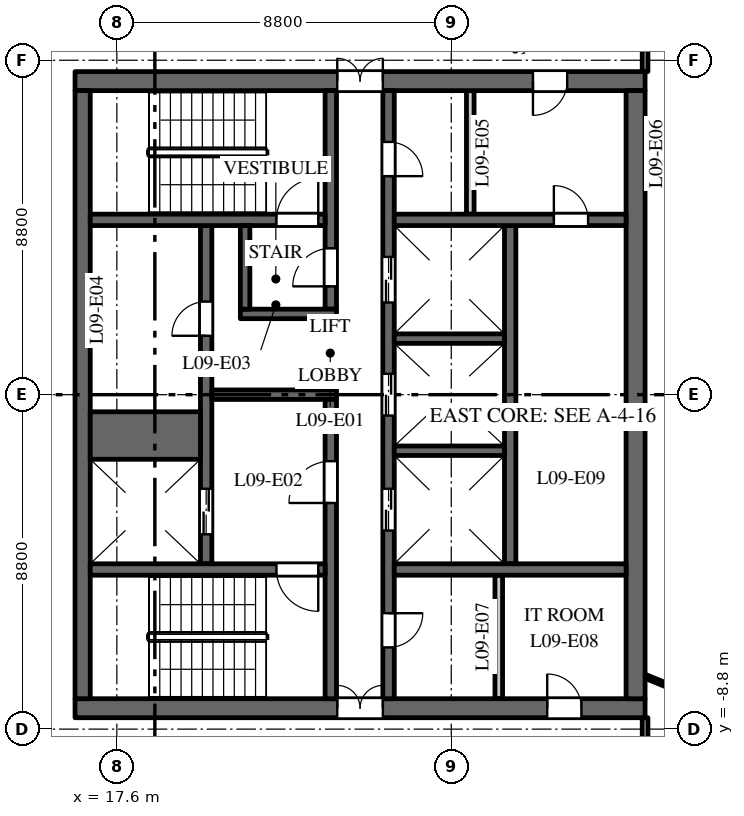
"""IFC4 building model, lengths in metres.
Left out: names, types, materials, properties, quantities, classifications, styles, units other than length and angle.
Written with IfcOpenShell. Run it as: python <this file> out.ifc"""

import sys

from ifc_helpers import new_model, si_unit, direction, frame, frame_2d, origin, place, context, subcontext, project, spatial, rectangle, extrude, element, fill, save


model = new_model("IFC4")
c1 = context("Model", 3, precision=1e-05, world=origin(), true_north=direction((0.0, 1.0)))
c2 = subcontext(c1, "Body", "Model", "MODEL_VIEW")
j1 = project(units=[si_unit("LENGTHUNIT", "METRE"), si_unit("PLANEANGLEUNIT", "RADIAN")], contexts=[c1])
p1 = place(None, origin())
s1 = spatial("IfcSite", under=j1, at=p1, CompositionType="ELEMENT")
p2 = place(p1, origin())
s2 = spatial("IfcBuilding", under=s1, at=p2, CompositionType="ELEMENT")
p3 = place(p2, frame((0.0, 0.0, 46.5)))
s3 = spatial("IfcBuildingStorey", under=s2, at=p3, CompositionType="ELEMENT", Elevation=46.5)
p4 = place(p3, frame((16.5, 8.25, 0.0), z_axis=(0.0, 0.0, 1.0), x_axis=(1.0, 0.0, 0.0)))
e1 = element("IfcWall", 1, at=p4, inside=s3, PredefinedType="SHEAR", context=c2, shape_type="SweptSolid", body=[
    extrude(rectangle(XDim=15.0, YDim=0.5, at=frame_2d((7.5, 0.0))), origin(), (0.0, 0.0, 1.0), 3.7),
])
p5 = place(p4, frame((6.9, 0.0, 0.0)))
e2 = element("IfcOpeningElement", 2, at=p5, cuts=e1, PredefinedType="OPENING", context=c2, shape_type="SweptSolid", body=[
    extrude(rectangle(XDim=1.2, YDim=2.1, at=frame_2d((0.6, 1.05))), frame((0.0, 0.26, 0.0), z_axis=(0.0, -1.0, 0.0), x_axis=(1.0, 0.0, 0.0)), (0.0, 0.0, 1.0), 0.52),
])
p6 = place(p4, frame((12.05, 0.0, 0.0)))
e3 = element("IfcOpeningElement", 3, at=p6, cuts=e1, PredefinedType="OPENING", context=c2, shape_type="SweptSolid", body=[
    extrude(rectangle(XDim=0.9, YDim=2.1, at=frame_2d((0.45, 1.05))), frame((0.0, 0.26, 0.0), z_axis=(0.0, -1.0, 0.0), x_axis=(1.0, 0.0, 0.0)), (0.0, 0.0, 1.0), 0.52),
])
p7 = place(p3, frame((16.5, -8.25, 0.0), z_axis=(0.0, 0.0, 1.0), x_axis=(1.0, 0.0, 0.0)))
e4 = element("IfcWall", 4, at=p7, inside=s3, PredefinedType="SHEAR", context=c2, shape_type="SweptSolid", body=[
    extrude(rectangle(XDim=15.0, YDim=0.5, at=frame_2d((7.5, 0.0))), origin(), (0.0, 0.0, 1.0), 3.7),
])
p8 = place(p7, frame((6.9, 0.0, 0.0)))
e5 = element("IfcOpeningElement", 5, at=p8, cuts=e4, PredefinedType="OPENING", context=c2, shape_type="SweptSolid", body=[
    extrude(rectangle(XDim=1.2, YDim=2.1, at=frame_2d((0.6, 1.05))), frame((0.0, 0.26, 0.0), z_axis=(0.0, -1.0, 0.0), x_axis=(1.0, 0.0, 0.0)), (0.0, 0.0, 1.0), 0.52),
])
p9 = place(p7, frame((12.425, 0.0, 0.0)))
e6 = element("IfcOpeningElement", 6, at=p9, cuts=e4, PredefinedType="OPENING", context=c2, shape_type="SweptSolid", body=[
    extrude(rectangle(XDim=0.9, YDim=2.1, at=frame_2d((0.45, 1.05))), frame((0.0, 0.26, 0.0), z_axis=(0.0, -1.0, 0.0), x_axis=(1.0, 0.0, 0.0)), (0.0, 0.0, 1.0), 0.52),
])
p10 = place(p3, frame((27.95, -4.45, 0.0), z_axis=(0.0, 0.0, 1.0), x_axis=(0.0, 1.0, 0.0)))
e7 = element("IfcWall", 7, at=p10, inside=s3, PredefinedType="SHEAR", context=c2, shape_type="SweptSolid", body=[
    extrude(rectangle(XDim=8.9, YDim=0.3, at=frame_2d((4.45, 0.0))), origin(), (0.0, 0.0, 1.0), 3.7),
])
p11 = place(p3, frame((19.95, -4.45, 0.0), z_axis=(0.0, 0.0, 1.0), x_axis=(0.0, 1.0, 0.0)))
e8 = element("IfcWall", 8, at=p11, inside=s3, PredefinedType="SHEAR", context=c2, shape_type="SweptSolid", body=[
    extrude(rectangle(XDim=8.9, YDim=0.3, at=frame_2d((4.45, 0.0))), origin(), (0.0, 0.0, 1.0), 3.7),
])
p12 = place(p11, frame((0.775, 0.0, 0.0)))
e9 = element("IfcOpeningElement", 9, at=p12, cuts=e8, PredefinedType="OPENING", context=c2, shape_type="SweptSolid", body=[
    extrude(rectangle(XDim=1.2, YDim=2.1, at=frame_2d((0.6, 1.05))), frame((0.0, 0.16, 0.0), z_axis=(0.0, -1.0, 0.0), x_axis=(1.0, 0.0, 0.0)), (0.0, 0.0, 1.0), 0.32),
])
p13 = place(p11, frame((6.0, 0.0, 0.0)))
e10 = element("IfcOpeningElement", 10, at=p13, cuts=e8, PredefinedType="OPENING", context=c2, shape_type="SweptSolid", body=[
    extrude(rectangle(XDim=0.9, YDim=2.1, at=frame_2d((0.45, 1.05))), frame((0.0, 0.16, 0.0), z_axis=(0.0, -1.0, 0.0), x_axis=(1.0, 0.0, 0.0)), (0.0, 0.0, 1.0), 0.32),
])
p14 = place(p3, frame((24.75, -8.0, 0.0), z_axis=(0.0, 0.0, 1.0), x_axis=(0.0, 1.0, 0.0)))
e11 = element("IfcWall", 11, at=p14, inside=s3, PredefinedType="SHEAR", context=c2, shape_type="SweptSolid", body=[
    extrude(rectangle(XDim=16.0, YDim=0.3, at=frame_2d((8.0, 0.0))), origin(), (0.0, 0.0, 1.0), 3.7),
])
p15 = place(p14, frame((4.425, 0.0, 0.0)))
e12 = element("IfcOpeningElement", 12, at=p15, cuts=e11, PredefinedType="OPENING", context=c2, shape_type="SweptSolid", body=[
    extrude(rectangle(XDim=1.1, YDim=2.1, at=frame_2d((0.55, 1.05))), frame((0.0, 0.16, 0.0), z_axis=(0.0, -1.0, 0.0), x_axis=(1.0, 0.0, 0.0)), (0.0, 0.0, 1.0), 0.32),
])
p16 = place(p14, frame((7.45, 0.0, 0.0)))
e13 = element("IfcOpeningElement", 13, at=p16, cuts=e11, PredefinedType="OPENING", context=c2, shape_type="SweptSolid", body=[
    extrude(rectangle(XDim=1.1, YDim=2.1, at=frame_2d((0.55, 1.05))), frame((0.0, 0.16, 0.0), z_axis=(0.0, -1.0, 0.0), x_axis=(1.0, 0.0, 0.0)), (0.0, 0.0, 1.0), 0.32),
])
p17 = place(p14, frame((10.425, 0.0, 0.0)))
e14 = element("IfcOpeningElement", 14, at=p17, cuts=e11, PredefinedType="OPENING", context=c2, shape_type="SweptSolid", body=[
    extrude(rectangle(XDim=1.2, YDim=2.1, at=frame_2d((0.6, 1.05))), frame((0.0, 0.16, 0.0), z_axis=(0.0, -1.0, 0.0), x_axis=(1.0, 0.0, 0.0)), (0.0, 0.0, 1.0), 0.32),
])
p18 = place(p14, frame((13.75, 0.0, 0.0)))
e15 = element("IfcOpeningElement", 15, at=p18, cuts=e11, PredefinedType="OPENING", context=c2, shape_type="SweptSolid", body=[
    extrude(rectangle(XDim=0.9, YDim=2.1, at=frame_2d((0.45, 1.05))), frame((0.0, 0.16, 0.0), z_axis=(0.0, -1.0, 0.0), x_axis=(1.0, 0.0, 0.0)), (0.0, 0.0, 1.0), 0.32),
])
p19 = place(p14, frame((1.35, 0.0, 0.0)))
e16 = element("IfcOpeningElement", 16, at=p19, cuts=e11, PredefinedType="OPENING", context=c2, shape_type="SweptSolid", body=[
    extrude(rectangle(XDim=0.9, YDim=2.1, at=frame_2d((0.45, 1.05))), frame((0.0, 0.16, 0.0), z_axis=(0.0, -1.0, 0.0), x_axis=(1.0, 0.0, 0.0)), (0.0, 0.0, 1.0), 0.32),
])
p20 = place(p3, frame((20.1, 0.0, 0.0), z_axis=(0.0, 0.0, 1.0), x_axis=(1.0, 0.0, 0.0)))
e17 = element("IfcWall", 17, at=p20, inside=s3, PredefinedType="SHEAR", context=c2, shape_type="SweptSolid", body=[
    extrude(rectangle(XDim=3.28, YDim=0.25, at=frame_2d((1.64, 0.0))), origin(), (0.0, 0.0, 1.0), 3.7),
])
p21 = place(p3, frame((16.7, -8.0, 0.0), z_axis=(0.0, 0.0, 1.0), x_axis=(0.0, 1.0, 0.0)))
e18 = element("IfcWall", 18, at=p21, inside=s3, PredefinedType="SHEAR", context=c2, shape_type="SweptSolid", body=[
    extrude(rectangle(XDim=16.0, YDim=0.4, at=frame_2d((8.0, 0.0))), origin(), (0.0, 0.0, 1.0), 3.7),
])
p22 = place(p3, frame((31.25, -8.0, 0.0), z_axis=(0.0, 0.0, 1.0), x_axis=(0.0, 1.0, 0.0)))
e19 = element("IfcWall", 19, at=p22, inside=s3, PredefinedType="SHEAR", context=c2, shape_type="SweptSolid", body=[
    extrude(rectangle(XDim=16.0, YDim=0.5, at=frame_2d((8.0, 0.0))), origin(), (0.0, 0.0, 1.0), 3.7),
])
p23 = place(p3, frame((24.9, 4.6, 0.0), z_axis=(0.0, 0.0, 1.0), x_axis=(1.0, 0.0, 0.0)))
e20 = element("IfcWall", 20, at=p23, inside=s3, PredefinedType="SHEAR", context=c2, shape_type="SweptSolid", body=[
    extrude(rectangle(XDim=6.1, YDim=0.3, at=frame_2d((3.05, 0.0))), origin(), (0.0, 0.0, 1.0), 3.7),
])
p24 = place(p23, frame((4.2, 0.0, 0.0)))
e21 = element("IfcOpeningElement", 21, at=p24, cuts=e20, PredefinedType="OPENING", context=c2, shape_type="SweptSolid", body=[
    extrude(rectangle(XDim=0.9, YDim=2.1, at=frame_2d((0.45, 1.05))), frame((0.0, 0.16, 0.0), z_axis=(0.0, -1.0, 0.0), x_axis=(1.0, 0.0, 0.0)), (0.0, 0.0, 1.0), 0.32),
])
for number, where, z_axis, x_axis in (
    (22, (26.9, 4.75, 0.0), (0.0, 0.0, 1.0), (0.0, 1.0, 0.0)),
    (23, (27.65, -8.0, 0.0), (0.0, 0.0, 1.0), (0.0, 1.0, 0.0)),
):
    element("IfcWall", number, at=place(p3, frame(where, z_axis=z_axis, x_axis=x_axis)), inside=s3, PredefinedType="PARTITIONING", context=c2, shape_type="SweptSolid", body=[
        extrude(rectangle(XDim=3.25, YDim=0.2, at=frame_2d((1.625, 0.0))), origin(), (0.0, 0.0, 1.0), 3.7),
    ])
p25 = place(p3, frame((24.9, -4.6, 0.0), z_axis=(0.0, 0.0, 1.0), x_axis=(1.0, 0.0, 0.0)))
e24 = element("IfcWall", 24, at=p25, inside=s3, PredefinedType="SHEAR", context=c2, shape_type="SweptSolid", body=[
    extrude(rectangle(XDim=6.1, YDim=0.3, at=frame_2d((3.05, 0.0))), origin(), (0.0, 0.0, 1.0), 3.7),
])
p26 = place(p3, frame((16.9, -1.075, 0.0), z_axis=(0.0, 0.0, 1.0), x_axis=(1.0, 0.0, 0.0)))
e25 = element("IfcWall", 25, at=p26, inside=s3, PredefinedType="SHEAR", context=c2, shape_type="SweptSolid", body=[
    extrude(rectangle(XDim=2.9, YDim=1.25, at=frame_2d((1.45, 0.0))), origin(), (0.0, 0.0, 1.0), 3.7),
])
for number, where, z_axis, x_axis in (
    (26, (24.9, -1.475, 0.0), (0.0, 0.0, 1.0), (1.0, 0.0, 0.0)),
    (27, (24.9, 1.475, 0.0), (0.0, 0.0, 1.0), (1.0, 0.0, 0.0)),
):
    element("IfcWall", number, at=place(p3, frame(where, z_axis=z_axis, x_axis=x_axis)), inside=s3, PredefinedType="SHEAR", context=c2, shape_type="SweptSolid", body=[
        extrude(rectangle(XDim=2.9, YDim=0.25, at=frame_2d((1.45, 0.0))), origin(), (0.0, 0.0, 1.0), 3.7),
    ])
p27 = place(p3, frame((23.23, 2.25, 0.0), z_axis=(0.0, 0.0, 1.0), x_axis=(0.0, 1.0, 0.0)))
e28 = element("IfcWall", 28, at=p27, inside=s3, PredefinedType="SHEAR", context=c2, shape_type="SweptSolid", body=[
    extrude(rectangle(XDim=5.75, YDim=0.3, at=frame_2d((2.875, 0.0))), origin(), (0.0, 0.0, 1.0), 3.7),
])
p28 = place(p27, frame((0.6, 0.0, 0.0)))
e29 = element("IfcOpeningElement", 29, at=p28, cuts=e28, PredefinedType="OPENING", context=c2, shape_type="SweptSolid", body=[
    extrude(rectangle(XDim=1.0, YDim=2.1, at=frame_2d((0.5, 1.05))), frame((0.0, 0.16, 0.0), z_axis=(0.0, -1.0, 0.0), x_axis=(1.0, 0.0, 0.0)), (0.0, 0.0, 1.0), 0.32),
])
p29 = place(p3, frame((23.23, -8.0, 0.0), z_axis=(0.0, 0.0, 1.0), x_axis=(0.0, 1.0, 0.0)))
e30 = element("IfcWall", 30, at=p29, inside=s3, PredefinedType="SHEAR", context=c2, shape_type="SweptSolid", body=[
    extrude(rectangle(XDim=7.875, YDim=0.3, at=frame_2d((3.938, 0.0))), origin(), (0.0, 0.0, 1.0), 3.7),
])
p30 = place(p29, frame((5.15, 0.0, 0.0)))
e31 = element("IfcOpeningElement", 31, at=p30, cuts=e30, PredefinedType="OPENING", context=c2, shape_type="SweptSolid", body=[
    extrude(rectangle(XDim=1.1, YDim=2.1, at=frame_2d((0.55, 1.05))), frame((0.0, 0.16, 0.0), z_axis=(0.0, -1.0, 0.0), x_axis=(1.0, 0.0, 0.0)), (0.0, 0.0, 1.0), 0.32),
])
p31 = place(p3, frame((16.9, 4.6, 0.0), z_axis=(0.0, 0.0, 1.0), x_axis=(1.0, 0.0, 0.0)))
e32 = element("IfcWall", 32, at=p31, inside=s3, PredefinedType="SHEAR", context=c2, shape_type="SweptSolid", body=[
    extrude(rectangle(XDim=6.18, YDim=0.3, at=frame_2d((3.09, 0.0))), origin(), (0.0, 0.0, 1.0), 3.7),
])
p32 = place(p31, frame((4.9, 0.0, 0.0)))
e33 = element("IfcOpeningElement", 33, at=p32, cuts=e32, PredefinedType="OPENING", context=c2, shape_type="SweptSolid", body=[
    extrude(rectangle(XDim=1.1, YDim=2.1, at=frame_2d((0.55, 1.05))), frame((0.0, 0.16, 0.0), z_axis=(0.0, -1.0, 0.0), x_axis=(1.0, 0.0, 0.0)), (0.0, 0.0, 1.0), 0.32),
])
p33 = place(p3, frame((16.9, -4.6, 0.0), z_axis=(0.0, 0.0, 1.0), x_axis=(1.0, 0.0, 0.0)))
e34 = element("IfcWall", 34, at=p33, inside=s3, PredefinedType="SHEAR", context=c2, shape_type="SweptSolid", body=[
    extrude(rectangle(XDim=6.18, YDim=0.3, at=frame_2d((3.09, 0.0))), origin(), (0.0, 0.0, 1.0), 3.7),
])
p34 = place(p33, frame((4.9, 0.0, 0.0)))
e35 = element("IfcOpeningElement", 35, at=p34, cuts=e34, PredefinedType="OPENING", context=c2, shape_type="SweptSolid", body=[
    extrude(rectangle(XDim=1.1, YDim=2.1, at=frame_2d((0.55, 1.05))), frame((0.0, 0.16, 0.0), z_axis=(0.0, -1.0, 0.0), x_axis=(1.0, 0.0, 0.0)), (0.0, 0.0, 1.0), 0.32),
])
p35 = place(p3, frame((20.85, 2.125, 0.0), z_axis=(0.0, 0.0, 1.0), x_axis=(1.0, 0.0, 0.0)))
e36 = element("IfcWall", 36, at=p35, inside=s3, PredefinedType="SHEAR", context=c2, shape_type="SweptSolid", body=[
    extrude(rectangle(XDim=2.53, YDim=0.25, at=frame_2d((1.265, 0.0))), origin(), (0.0, 0.0, 1.0), 3.7),
])
p36 = place(p3, frame((20.975, 2.25, 0.0), z_axis=(0.0, 0.0, 1.0), x_axis=(0.0, 1.0, 0.0)))
e37 = element("IfcWall", 37, at=p36, inside=s3, PredefinedType="SHEAR", context=c2, shape_type="SweptSolid", body=[
    extrude(rectangle(XDim=2.2, YDim=0.25, at=frame_2d((1.1, 0.0))), origin(), (0.0, 0.0, 1.0), 3.7),
])
p37 = place(p3, frame((31.5, -10.7, 0.0), z_axis=(0.0, 0.0, 1.0), x_axis=(0.0, 1.0, 0.0)))
e38 = element("IfcWall", 38, at=p37, inside=s3, PredefinedType="PARTITIONING", context=c2, shape_type="SweptSolid", body=[
    extrude(rectangle(XDim=2.2, YDim=0.15, at=frame_2d((1.1, 0.0))), origin(), (0.0, 0.0, 1.0), 2.85),
])
p38 = place(p3, frame((31.5, -7.41, 0.0), z_axis=(0.0, 0.0, 1.0), x_axis=(0.925344112436, -0.379128307542, 0.0)))
e39 = element("IfcWall", 39, at=p38, inside=s3, PredefinedType="PARTITIONING", context=c2, shape_type="SweptSolid", body=[
    extrude(rectangle(XDim=2.954, YDim=0.1, at=frame_2d((1.477, 0.0))), origin(), (0.0, 0.0, 1.0), 3.7),
])
p39 = place(p3, frame((31.5, 8.5, 0.0), z_axis=(0.0, 0.0, 1.0), x_axis=(0.0, 1.0, 0.0)))
e40 = element("IfcWall", 40, at=p39, inside=s3, PredefinedType="PARTITIONING", context=c2, shape_type="SweptSolid", body=[
    extrude(rectangle(XDim=2.2, YDim=0.15, at=frame_2d((1.1, 0.0))), origin(), (0.0, 0.0, 1.0), 2.85),
])
p40 = place(p12, origin())
e41 = element("IfcDoor", 41, at=p40, inside=s3, OperationType="DOUBLE_DOOR_SLIDING", PredefinedType="DOOR", context=c2, shape_type="SweptSolid", body=[
    extrude(rectangle(XDim=1.2, YDim=2.1, at=frame_2d((0.6, 1.05))), frame((0.0, 0.025, 0.0), z_axis=(0.0, -1.0, 0.0), x_axis=(1.0, 0.0, 0.0)), (0.0, 0.0, 1.0), 0.05),
])
fill(e9, e41)
p41 = place(p15, origin())
e42 = element("IfcDoor", 42, at=p41, inside=s3, OperationType="DOUBLE_DOOR_SLIDING", PredefinedType="DOOR", context=c2, shape_type="SweptSolid", body=[
    extrude(rectangle(XDim=1.1, YDim=2.1, at=frame_2d((0.55, 1.05))), frame((0.0, 0.025, 0.0), z_axis=(0.0, -1.0, 0.0), x_axis=(1.0, 0.0, 0.0)), (0.0, 0.0, 1.0), 0.05),
])
fill(e12, e42)
p42 = place(p16, origin())
e43 = element("IfcDoor", 43, at=p42, inside=s3, OperationType="DOUBLE_DOOR_SLIDING", PredefinedType="DOOR", context=c2, shape_type="SweptSolid", body=[
    extrude(rectangle(XDim=1.1, YDim=2.1, at=frame_2d((0.55, 1.05))), frame((0.0, 0.025, 0.0), z_axis=(0.0, -1.0, 0.0), x_axis=(1.0, 0.0, 0.0)), (0.0, 0.0, 1.0), 0.05),
])
fill(e13, e43)
p43 = place(p17, origin())
e44 = element("IfcDoor", 44, at=p43, inside=s3, OperationType="DOUBLE_DOOR_SLIDING", PredefinedType="DOOR", context=c2, shape_type="SweptSolid", body=[
    extrude(rectangle(XDim=1.2, YDim=2.1, at=frame_2d((0.6, 1.05))), frame((0.0, 0.025, 0.0), z_axis=(0.0, -1.0, 0.0), x_axis=(1.0, 0.0, 0.0)), (0.0, 0.0, 1.0), 0.05),
])
fill(e14, e44)
p44 = place(p32, origin())
e45 = element("IfcDoor", 45, at=p44, inside=s3, OperationType="SINGLE_SWING_LEFT", PredefinedType="DOOR", context=c2, shape_type="SweptSolid", body=[
    extrude(rectangle(XDim=1.1, YDim=2.1, at=frame_2d((0.55, 1.05))), frame((0.0, 0.025, 0.0), z_axis=(0.0, -1.0, 0.0), x_axis=(1.0, 0.0, 0.0)), (0.0, 0.0, 1.0), 0.05),
])
fill(e33, e45)
p45 = place(p34, origin())
e46 = element("IfcDoor", 46, at=p45, inside=s3, OperationType="SINGLE_SWING_RIGHT", PredefinedType="DOOR", context=c2, shape_type="SweptSolid", body=[
    extrude(rectangle(XDim=1.1, YDim=2.1, at=frame_2d((0.55, 1.05))), frame((0.0, 0.025, 0.0), z_axis=(0.0, -1.0, 0.0), x_axis=(1.0, 0.0, 0.0)), (0.0, 0.0, 1.0), 0.05),
])
fill(e35, e46)
p46 = place(p30, origin())
e47 = element("IfcDoor", 47, at=p46, inside=s3, OperationType="SINGLE_SWING_RIGHT", PredefinedType="DOOR", context=c2, shape_type="SweptSolid", body=[
    extrude(rectangle(XDim=1.1, YDim=2.1, at=frame_2d((0.55, 1.05))), frame((0.0, 0.025, 0.0), z_axis=(0.0, -1.0, 0.0), x_axis=(1.0, 0.0, 0.0)), (0.0, 0.0, 1.0), 0.05),
])
fill(e31, e47)
p47 = place(p28, origin())
e48 = element("IfcDoor", 48, at=p47, inside=s3, OperationType="SINGLE_SWING_RIGHT", PredefinedType="DOOR", context=c2, shape_type="SweptSolid", body=[
    extrude(rectangle(XDim=1.0, YDim=2.1, at=frame_2d((0.5, 1.05))), frame((0.0, 0.025, 0.0), z_axis=(0.0, -1.0, 0.0), x_axis=(1.0, 0.0, 0.0)), (0.0, 0.0, 1.0), 0.05),
])
fill(e29, e48)
p48 = place(p5, origin())
e49 = element("IfcDoor", 49, at=p48, inside=s3, OperationType="DOUBLE_DOOR_DOUBLE_SWING", PredefinedType="DOOR", context=c2, shape_type="SweptSolid", body=[
    extrude(rectangle(XDim=1.2, YDim=2.1, at=frame_2d((0.6, 1.05))), frame((0.0, 0.025, 0.0), z_axis=(0.0, -1.0, 0.0), x_axis=(1.0, 0.0, 0.0)), (0.0, 0.0, 1.0), 0.05),
])
fill(e2, e49)
p49 = place(p8, origin())
e50 = element("IfcDoor", 50, at=p49, inside=s3, OperationType="DOUBLE_DOOR_DOUBLE_SWING", PredefinedType="DOOR", context=c2, shape_type="SweptSolid", body=[
    extrude(rectangle(XDim=1.2, YDim=2.1, at=frame_2d((0.6, 1.05))), frame((0.0, 0.025, 0.0), z_axis=(0.0, -1.0, 0.0), x_axis=(1.0, 0.0, 0.0)), (0.0, 0.0, 1.0), 0.05),
])
fill(e5, e50)
p50 = place(p13, origin())
e51 = element("IfcDoor", 51, at=p50, inside=s3, OperationType="SINGLE_SWING_RIGHT", PredefinedType="DOOR", context=c2, shape_type="SweptSolid", body=[
    extrude(rectangle(XDim=0.9, YDim=2.1, at=frame_2d((0.45, 1.05))), frame((0.0, 0.025, 0.0), z_axis=(0.0, -1.0, 0.0), x_axis=(1.0, 0.0, 0.0)), (0.0, 0.0, 1.0), 0.05),
])
fill(e10, e51)
p51 = place(p18, origin())
e52 = element("IfcDoor", 52, at=p51, inside=s3, OperationType="SINGLE_SWING_LEFT", PredefinedType="DOOR", context=c2, shape_type="SweptSolid", body=[
    extrude(rectangle(XDim=0.9, YDim=2.1, at=frame_2d((0.45, 1.05))), frame((0.0, 0.025, 0.0), z_axis=(0.0, -1.0, 0.0), x_axis=(1.0, 0.0, 0.0)), (0.0, 0.0, 1.0), 0.05),
])
fill(e15, e52)
p52 = place(p6, origin())
e53 = element("IfcDoor", 53, at=p52, inside=s3, OperationType="SINGLE_SWING_LEFT", PredefinedType="DOOR", context=c2, shape_type="SweptSolid", body=[
    extrude(rectangle(XDim=0.9, YDim=2.1, at=frame_2d((0.45, 1.05))), frame((0.0, 0.025, 0.0), z_axis=(0.0, -1.0, 0.0), x_axis=(1.0, 0.0, 0.0)), (0.0, 0.0, 1.0), 0.05),
])
fill(e3, e53)
p53 = place(p19, origin())
e54 = element("IfcDoor", 54, at=p53, inside=s3, OperationType="SINGLE_SWING_RIGHT", PredefinedType="DOOR", context=c2, shape_type="SweptSolid", body=[
    extrude(rectangle(XDim=0.9, YDim=2.1, at=frame_2d((0.45, 1.05))), frame((0.0, 0.025, 0.0), z_axis=(0.0, -1.0, 0.0), x_axis=(1.0, 0.0, 0.0)), (0.0, 0.0, 1.0), 0.05),
])
fill(e16, e54)
p54 = place(p9, origin())
e55 = element("IfcDoor", 55, at=p54, inside=s3, OperationType="SINGLE_SWING_RIGHT", PredefinedType="DOOR", context=c2, shape_type="SweptSolid", body=[
    extrude(rectangle(XDim=0.9, YDim=2.1, at=frame_2d((0.45, 1.05))), frame((0.0, 0.025, 0.0), z_axis=(0.0, -1.0, 0.0), x_axis=(1.0, 0.0, 0.0)), (0.0, 0.0, 1.0), 0.05),
])
fill(e6, e55)
p55 = place(p24, origin())
e56 = element("IfcDoor", 56, at=p55, inside=s3, OperationType="SINGLE_SWING_RIGHT", PredefinedType="DOOR", context=c2, shape_type="SweptSolid", body=[
    extrude(rectangle(XDim=0.9, YDim=2.1, at=frame_2d((0.45, 1.05))), frame((0.0, 0.025, 0.0), z_axis=(0.0, -1.0, 0.0), x_axis=(1.0, 0.0, 0.0)), (0.0, 0.0, 1.0), 0.05),
])
fill(e21, e56)
save(model, sys.argv[1])
